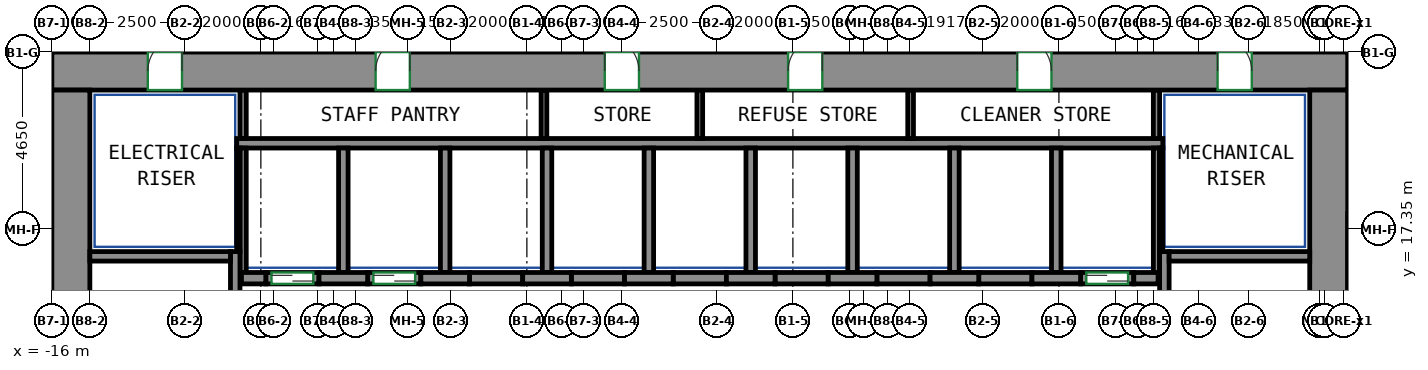
"""IFC4 building model, lengths in metres.
Left out: names, types, materials, properties, quantities, classifications, styles, units other than length and angle.
Written with IfcOpenShell. Run it as: python <this file> out.ifc"""

import sys

from ifc_helpers import new_model, si_unit, direction, frame, frame_2d, origin, place, context, subcontext, project, spatial, rectangle, extrude, source, transform, mapped, element, fill, save


model = new_model("IFC4")
c1 = context("Model", 3, precision=1e-05, world=origin(), true_north=direction((0.0, 1.0)))
c2 = subcontext(c1, "Body", "Model", "MODEL_VIEW")
j1 = project(units=[si_unit("LENGTHUNIT", "METRE"), si_unit("PLANEANGLEUNIT", "RADIAN")], contexts=[c1])
p1 = place(None, origin())
s1 = spatial("IfcSite", under=j1, at=p1, CompositionType="ELEMENT")
p2 = place(p1, origin())
s2 = spatial("IfcBuilding", under=s1, at=p2, CompositionType="ELEMENT")
p3 = place(p2, frame((0.0, 0.0, 55.0)))
s3 = spatial("IfcBuildingStorey", under=s2, at=p3, CompositionType="ELEMENT", Elevation=55.0)
m1 = source(origin(), c2, "Body", "SweptSolid", [
    extrude(rectangle(XDim=34.1, YDim=1.0, at=frame_2d((17.05, 0.0))), origin(), (0.0, 0.0, 1.0), 3.6),
])
p4 = place(p3, frame((-16.0, 21.5, 0.0), z_axis=(0.0, 0.0, 1.0), x_axis=(1.0, 0.0, 0.0)))
e1 = element("IfcWall", 1, at=p4, inside=s3, PredefinedType="SHEAR", context=c2, shape_type="MappedRepresentation", body=[
    mapped(m1, transform((0.0, 0.0, 0.0))),
])
p5 = place(p4, frame((8.52, 0.0, 0.0)))
e2 = element("IfcOpeningElement", 2, at=p5, cuts=e1, PredefinedType="OPENING", context=c2, shape_type="SweptSolid", body=[
    extrude(rectangle(XDim=0.9, YDim=2.1, at=frame_2d((0.45, 1.05))), frame((0.0, 0.51, 0.0), z_axis=(0.0, -1.0, 0.0), x_axis=(1.0, 0.0, 0.0)), (0.0, 0.0, 1.0), 1.02),
])
p6 = place(p4, frame((14.55, 0.0, 0.0)))
e3 = element("IfcOpeningElement", 3, at=p6, cuts=e1, PredefinedType="OPENING", context=c2, shape_type="SweptSolid", body=[
    extrude(rectangle(XDim=0.9, YDim=2.1, at=frame_2d((0.45, 1.05))), frame((0.0, 0.51, 0.0), z_axis=(0.0, -1.0, 0.0), x_axis=(1.0, 0.0, 0.0)), (0.0, 0.0, 1.0), 1.02),
])
p7 = place(p4, frame((19.374, 0.0, 0.0)))
e4 = element("IfcOpeningElement", 4, at=p7, cuts=e1, PredefinedType="OPENING", context=c2, shape_type="SweptSolid", body=[
    extrude(rectangle(XDim=0.9, YDim=2.1, at=frame_2d((0.45, 1.05))), frame((0.0, 0.51, 0.0), z_axis=(0.0, -1.0, 0.0), x_axis=(1.0, 0.0, 0.0)), (0.0, 0.0, 1.0), 1.02),
])
p8 = place(p4, frame((25.404, 0.0, 0.0)))
e5 = element("IfcOpeningElement", 5, at=p8, cuts=e1, PredefinedType="OPENING", context=c2, shape_type="SweptSolid", body=[
    extrude(rectangle(XDim=0.9, YDim=2.1, at=frame_2d((0.45, 1.05))), frame((0.0, 0.51, 0.0), z_axis=(0.0, -1.0, 0.0), x_axis=(1.0, 0.0, 0.0)), (0.0, 0.0, 1.0), 1.02),
])
p9 = place(p4, frame((2.525, 0.0, 0.0)))
e6 = element("IfcOpeningElement", 6, at=p9, cuts=e1, PredefinedType="OPENING", context=c2, shape_type="SweptSolid", body=[
    extrude(rectangle(XDim=0.9, YDim=2.1, at=frame_2d((0.45, 1.05))), frame((0.0, 0.51, 0.0), z_axis=(0.0, -1.0, 0.0), x_axis=(1.0, 0.0, 0.0)), (0.0, 0.0, 1.0), 1.02),
])
p10 = place(p4, frame((30.675, 0.0, 0.0)))
e7 = element("IfcOpeningElement", 7, at=p10, cuts=e1, PredefinedType="OPENING", context=c2, shape_type="SweptSolid", body=[
    extrude(rectangle(XDim=0.9, YDim=2.1, at=frame_2d((0.45, 1.05))), frame((0.0, 0.51, 0.0), z_axis=(0.0, -1.0, 0.0), x_axis=(1.0, 0.0, 0.0)), (0.0, 0.0, 1.0), 1.02),
])
m2 = source(origin(), c2, "Body", "SweptSolid", [
    extrude(rectangle(XDim=12.0, YDim=1.0, at=frame_2d((6.0, 0.0))), origin(), (0.0, 0.0, 1.0), 3.6),
])
for number, where, z_axis, x_axis in (
    (8, (-15.5, 9.0, 0.0), (0.0, 0.0, 1.0), (0.0, 1.0, 0.0)),
    (9, (17.6, 9.0, 0.0), (0.0, 0.0, 1.0), (0.0, 1.0, 0.0)),
):
    element("IfcWall", number, at=place(p3, frame(where, z_axis=z_axis, x_axis=x_axis)), inside=s3, PredefinedType="SHEAR", context=c2, shape_type="MappedRepresentation", body=[
        mapped(m2, transform((0.0, 0.0, 0.0))),
    ])
m3 = source(origin(), c2, "Body", "SweptSolid", [
    extrude(rectangle(XDim=7.75, YDim=0.25, at=frame_2d((3.875, 0.0))), origin(), (0.0, 0.0, 1.0), 3.6),
])
p11 = place(p3, frame((-11.175, 9.0, 0.0), z_axis=(0.0, 0.0, 1.0), x_axis=(0.0, 1.0, 0.0)))
e10 = element("IfcWall", 10, at=p11, inside=s3, PredefinedType="SHEAR", context=c2, shape_type="MappedRepresentation", body=[
    mapped(m3, transform((0.0, 0.0, 0.0))),
])
m4 = source(origin(), c2, "Body", "SweptSolid", [
    extrude(rectangle(XDim=3.7, YDim=0.25, at=frame_2d((1.85, 0.0))), origin(), (0.0, 0.0, 1.0), 3.6),
])
p12 = place(p3, frame((-15.0, 16.625, 0.0), z_axis=(0.0, 0.0, 1.0), x_axis=(1.0, 0.0, 0.0)))
e11 = element("IfcWall", 11, at=p12, inside=s3, PredefinedType="SHEAR", context=c2, shape_type="MappedRepresentation", body=[
    mapped(m4, transform((0.0, 0.0, 0.0))),
])
p13 = place(p3, frame((13.275, 9.0, 0.0), z_axis=(0.0, 0.0, 1.0), x_axis=(0.0, 1.0, 0.0)))
e12 = element("IfcWall", 12, at=p13, inside=s3, PredefinedType="SHEAR", context=c2, shape_type="MappedRepresentation", body=[
    mapped(m3, transform((0.0, 0.0, 0.0))),
])
m5 = source(origin(), c2, "Body", "SweptSolid", [
    extrude(rectangle(XDim=3.7, YDim=0.25, at=frame_2d((1.85, 0.0))), origin(), (0.0, 0.0, 1.0), 3.6),
])
p14 = place(p3, frame((13.4, 16.625, 0.0), z_axis=(0.0, 0.0, 1.0), x_axis=(1.0, 0.0, 0.0)))
e13 = element("IfcWall", 13, at=p14, inside=s3, PredefinedType="SHEAR", context=c2, shape_type="MappedRepresentation", body=[
    mapped(m5, transform((0.0, 0.0, 0.0))),
])
m6 = source(origin(), c2, "Body", "SweptSolid", [
    extrude(rectangle(XDim=0.64, YDim=0.3, at=frame_2d((0.32, 0.0))), origin(), (0.0, 0.0, 1.0), 3.6),
])
p15 = place(p3, frame((-11.01, 16.05, 0.0), z_axis=(0.0, 0.0, 1.0), x_axis=(1.0, 0.0, 0.0)))
e14 = element("IfcWall", 14, at=p15, inside=s3, PredefinedType="SHEAR", context=c2, shape_type="MappedRepresentation", body=[
    mapped(m6, transform((0.0, 0.0, 0.0))),
])
m7 = source(origin(), c2, "Body", "SweptSolid", [
    extrude(rectangle(XDim=1.28, YDim=0.3, at=frame_2d((0.64, 0.0))), origin(), (0.0, 0.0, 1.0), 3.6),
])
for number, where, z_axis, x_axis in (
    (15, (-8.97, 16.05, 0.0), (0.0, 0.0, 1.0), (1.0, 0.0, 0.0)),
    (16, (-6.29, 16.05, 0.0), (0.0, 0.0, 1.0), (1.0, 0.0, 0.0)),
    (17, (-3.61, 16.05, 0.0), (0.0, 0.0, 1.0), (1.0, 0.0, 0.0)),
    (18, (-0.93, 16.05, 0.0), (0.0, 0.0, 1.0), (1.0, 0.0, 0.0)),
    (19, (1.75, 16.05, 0.0), (0.0, 0.0, 1.0), (1.0, 0.0, 0.0)),
    (20, (4.43, 16.05, 0.0), (0.0, 0.0, 1.0), (1.0, 0.0, 0.0)),
):
    element("IfcWall", number, at=place(p3, frame(where, z_axis=z_axis, x_axis=x_axis)), inside=s3, PredefinedType="SHEAR", context=c2, shape_type="MappedRepresentation", body=[
        mapped(m7, transform((0.0, 0.0, 0.0))),
    ])
m8 = source(origin(), c2, "Body", "SweptSolid", [
    extrude(rectangle(XDim=1.28, YDim=0.3, at=frame_2d((0.64, 0.0))), origin(), (0.0, 0.0, 1.0), 3.6),
])
p16 = place(p3, frame((7.11, 16.05, 0.0), z_axis=(0.0, 0.0, 1.0), x_axis=(1.0, 0.0, 0.0)))
e21 = element("IfcWall", 21, at=p16, inside=s3, PredefinedType="SHEAR", context=c2, shape_type="MappedRepresentation", body=[
    mapped(m8, transform((0.0, 0.0, 0.0))),
])
p17 = place(p3, frame((9.79, 16.05, 0.0), z_axis=(0.0, 0.0, 1.0), x_axis=(1.0, 0.0, 0.0)))
e22 = element("IfcWall", 22, at=p17, inside=s3, PredefinedType="SHEAR", context=c2, shape_type="MappedRepresentation", body=[
    mapped(m7, transform((0.0, 0.0, 0.0))),
])
m9 = source(origin(), c2, "Body", "SweptSolid", [
    extrude(rectangle(XDim=0.64, YDim=0.3, at=frame_2d((0.32, 0.0))), origin(), (0.0, 0.0, 1.0), 3.6),
])
p18 = place(p3, frame((12.47, 16.05, 0.0), z_axis=(0.0, 0.0, 1.0), x_axis=(1.0, 0.0, 0.0)))
e23 = element("IfcWall", 23, at=p18, inside=s3, PredefinedType="SHEAR", context=c2, shape_type="MappedRepresentation", body=[
    mapped(m9, transform((0.0, 0.0, 0.0))),
])
m10 = source(origin(), c2, "Body", "SweptSolid", [
    extrude(rectangle(XDim=1.4, YDim=0.3, at=frame_2d((0.7, 0.0))), origin(), (0.0, 0.0, 1.0), 3.6),
])
p19 = place(p3, frame((11.07, 16.05, 0.0), z_axis=(0.0, 0.0, 1.0), x_axis=(1.0, 0.0, 0.0)))
e24 = element("IfcWall", 24, at=p19, inside=s3, PredefinedType="PARTITIONING", context=c2, shape_type="MappedRepresentation", body=[
    mapped(m10, transform((0.0, 0.0, 0.0))),
])
p20 = place(p19, frame((0.15, 0.0, 0.0)))
e25 = element("IfcOpeningElement", 25, at=p20, cuts=e24, PredefinedType="OPENING", context=c2, shape_type="SweptSolid", body=[
    extrude(rectangle(XDim=1.1, YDim=2.1, at=frame_2d((0.55, 1.05))), frame((0.0, 0.16, 0.0), z_axis=(0.0, -1.0, 0.0), x_axis=(1.0, 0.0, 0.0)), (0.0, 0.0, 1.0), 0.32),
])
m11 = source(origin(), c2, "Body", "SweptSolid", [
    extrude(rectangle(XDim=1.4, YDim=0.3, at=frame_2d((0.7, 0.0))), origin(), (0.0, 0.0, 1.0), 3.6),
])
p21 = place(p3, frame((-10.37, 16.05, 0.0), z_axis=(0.0, 0.0, 1.0), x_axis=(1.0, 0.0, 0.0)))
e26 = element("IfcWall", 26, at=p21, inside=s3, PredefinedType="PARTITIONING", context=c2, shape_type="MappedRepresentation", body=[
    mapped(m11, transform((0.0, 0.0, 0.0))),
])
p22 = place(p21, frame((0.15, 0.0, 0.0)))
e27 = element("IfcOpeningElement", 27, at=p22, cuts=e26, PredefinedType="OPENING", context=c2, shape_type="SweptSolid", body=[
    extrude(rectangle(XDim=1.1, YDim=2.1, at=frame_2d((0.55, 1.05))), frame((0.0, 0.16, 0.0), z_axis=(0.0, -1.0, 0.0), x_axis=(1.0, 0.0, 0.0)), (0.0, 0.0, 1.0), 0.32),
])
p23 = place(p3, frame((-7.69, 16.05, 0.0), z_axis=(0.0, 0.0, 1.0), x_axis=(1.0, 0.0, 0.0)))
e28 = element("IfcWall", 28, at=p23, inside=s3, PredefinedType="PARTITIONING", context=c2, shape_type="MappedRepresentation", body=[
    mapped(m10, transform((0.0, 0.0, 0.0))),
])
p24 = place(p23, frame((0.15, 0.0, 0.0)))
e29 = element("IfcOpeningElement", 29, at=p24, cuts=e28, PredefinedType="OPENING", context=c2, shape_type="SweptSolid", body=[
    extrude(rectangle(XDim=1.1, YDim=2.1, at=frame_2d((0.55, 1.05))), frame((0.0, 0.16, 0.0), z_axis=(0.0, -1.0, 0.0), x_axis=(1.0, 0.0, 0.0)), (0.0, 0.0, 1.0), 0.32),
])
p25 = place(p3, frame((-5.01, 16.05, 0.0), z_axis=(0.0, 0.0, 1.0), x_axis=(1.0, 0.0, 0.0)))
e30 = element("IfcWall", 30, at=p25, inside=s3, PredefinedType="PARTITIONING", context=c2, shape_type="MappedRepresentation", body=[
    mapped(m10, transform((0.0, 0.0, 0.0))),
])
p26 = place(p3, frame((-2.33, 16.05, 0.0), z_axis=(0.0, 0.0, 1.0), x_axis=(1.0, 0.0, 0.0)))
e31 = element("IfcWall", 31, at=p26, inside=s3, PredefinedType="PARTITIONING", context=c2, shape_type="MappedRepresentation", body=[
    mapped(m11, transform((0.0, 0.0, 0.0))),
])
for number, where, z_axis, x_axis in (
    (32, (0.35, 16.05, 0.0), (0.0, 0.0, 1.0), (1.0, 0.0, 0.0)),
    (33, (3.03, 16.05, 0.0), (0.0, 0.0, 1.0), (1.0, 0.0, 0.0)),
):
    element("IfcWall", number, at=place(p3, frame(where, z_axis=z_axis, x_axis=x_axis)), inside=s3, PredefinedType="PARTITIONING", context=c2, shape_type="MappedRepresentation", body=[
        mapped(m10, transform((0.0, 0.0, 0.0))),
    ])
for number, where, z_axis, x_axis in (
    (34, (5.71, 16.05, 0.0), (0.0, 0.0, 1.0), (1.0, 0.0, 0.0)),
    (35, (8.39, 16.05, 0.0), (0.0, 0.0, 1.0), (1.0, 0.0, 0.0)),
):
    element("IfcWall", number, at=place(p3, frame(where, z_axis=z_axis, x_axis=x_axis)), inside=s3, PredefinedType="PARTITIONING", context=c2, shape_type="MappedRepresentation", body=[
        mapped(m11, transform((0.0, 0.0, 0.0))),
    ])
m12 = source(origin(), c2, "Body", "SweptSolid", [
    extrude(rectangle(XDim=24.37, YDim=0.25, at=frame_2d((12.185, 0.0))), origin(), (0.0, 0.0, 1.0), 3.6),
])
p27 = place(p3, frame((-11.135, 19.6, 0.0), z_axis=(0.0, 0.0, 1.0), x_axis=(1.0, 0.0, 0.0)))
e36 = element("IfcWall", 36, at=p27, inside=s3, PredefinedType="PARTITIONING", context=c2, shape_type="MappedRepresentation", body=[
    mapped(m12, transform((0.0, 0.0, 0.0))),
])
m13 = source(origin(), c2, "Body", "SweptSolid", [
    extrude(rectangle(XDim=3.275, YDim=0.165, at=frame_2d((1.638, 0.0))), origin(), (0.0, 0.0, 1.0), 3.6),
])
p28 = place(p3, frame((13.067, 16.2, 0.0), z_axis=(0.0, 0.0, 1.0), x_axis=(0.0, 1.0, 0.0)))
e37 = element("IfcWall", 37, at=p28, inside=s3, PredefinedType="PARTITIONING", context=c2, shape_type="MappedRepresentation", body=[
    mapped(m13, transform((0.0, 0.0, 0.0))),
])
m14 = source(origin(), c2, "Body", "SweptSolid", [
    extrude(rectangle(XDim=1.275, YDim=0.165, at=frame_2d((0.637, 0.0))), origin(), (0.0, 0.0, 1.0), 3.6),
])
p29 = place(p3, frame((13.067, 19.725, 0.0), z_axis=(0.0, 0.0, 1.0), x_axis=(0.0, 1.0, 0.0)))
e38 = element("IfcWall", 38, at=p29, inside=s3, PredefinedType="PARTITIONING", context=c2, shape_type="MappedRepresentation", body=[
    mapped(m14, transform((0.0, 0.0, 0.0))),
])
p30 = place(p3, frame((-10.968, 16.2, 0.0), z_axis=(0.0, 0.0, 1.0), x_axis=(0.0, 1.0, 0.0)))
e39 = element("IfcWall", 39, at=p30, inside=s3, PredefinedType="PARTITIONING", context=c2, shape_type="MappedRepresentation", body=[
    mapped(m13, transform((0.0, 0.0, 0.0))),
])
p31 = place(p3, frame((-10.968, 19.725, 0.0), z_axis=(0.0, 0.0, 1.0), x_axis=(0.0, 1.0, 0.0)))
e40 = element("IfcWall", 40, at=p31, inside=s3, PredefinedType="PARTITIONING", context=c2, shape_type="MappedRepresentation", body=[
    mapped(m14, transform((0.0, 0.0, 0.0))),
])
m15 = source(origin(), c2, "Body", "SweptSolid", [
    extrude(rectangle(XDim=3.275, YDim=0.25, at=frame_2d((1.638, 0.0))), origin(), (0.0, 0.0, 1.0), 3.6),
])
p32 = place(p3, frame((10.43, 16.2, 0.0), z_axis=(0.0, 0.0, 1.0), x_axis=(0.0, 1.0, 0.0)))
e41 = element("IfcWall", 41, at=p32, inside=s3, PredefinedType="PARTITIONING", context=c2, shape_type="MappedRepresentation", body=[
    mapped(m15, transform((0.0, 0.0, 0.0))),
])
m16 = source(origin(), c2, "Body", "SweptSolid", [
    extrude(rectangle(XDim=2.725, YDim=0.085, at=frame_2d((1.363, 0.0))), origin(), (0.0, 0.0, 1.0), 3.6),
])
p33 = place(p3, frame((13.192, 16.75, 0.0), z_axis=(0.0, 0.0, 1.0), x_axis=(0.0, 1.0, 0.0)))
e42 = element("IfcWall", 42, at=p33, inside=s3, PredefinedType="PARTITIONING", context=c2, shape_type="MappedRepresentation", body=[
    mapped(m16, transform((0.0, 0.0, 0.0))),
])
for number, where, z_axis, x_axis in (
    (43, (2.39, 16.2, 0.0), (0.0, 0.0, 1.0), (0.0, 1.0, 0.0)),
    (44, (5.07, 16.2, 0.0), (0.0, 0.0, 1.0), (0.0, 1.0, 0.0)),
    (45, (7.75, 16.2, 0.0), (0.0, 0.0, 1.0), (0.0, 1.0, 0.0)),
    (46, (-0.29, 16.2, 0.0), (0.0, 0.0, 1.0), (0.0, 1.0, 0.0)),
):
    element("IfcWall", number, at=place(p3, frame(where, z_axis=z_axis, x_axis=x_axis)), inside=s3, PredefinedType="PARTITIONING", context=c2, shape_type="MappedRepresentation", body=[
        mapped(m15, transform((0.0, 0.0, 0.0))),
    ])
p34 = place(p3, frame((-11.093, 16.75, 0.0), z_axis=(0.0, 0.0, 1.0), x_axis=(0.0, 1.0, 0.0)))
e47 = element("IfcWall", 47, at=p34, inside=s3, PredefinedType="PARTITIONING", context=c2, shape_type="MappedRepresentation", body=[
    mapped(m16, transform((0.0, 0.0, 0.0))),
])
for number, where, z_axis, x_axis in (
    (48, (-2.97, 16.2, 0.0), (0.0, 0.0, 1.0), (0.0, 1.0, 0.0)),
    (49, (-5.65, 16.2, 0.0), (0.0, 0.0, 1.0), (0.0, 1.0, 0.0)),
    (50, (-8.33, 16.2, 0.0), (0.0, 0.0, 1.0), (0.0, 1.0, 0.0)),
):
    element("IfcWall", number, at=place(p3, frame(where, z_axis=z_axis, x_axis=x_axis)), inside=s3, PredefinedType="PARTITIONING", context=c2, shape_type="MappedRepresentation", body=[
        mapped(m15, transform((0.0, 0.0, 0.0))),
    ])
m17 = source(origin(), c2, "Body", "SweptSolid", [
    extrude(rectangle(XDim=1.275, YDim=0.15, at=frame_2d((0.637, 0.0))), origin(), (0.0, 0.0, 1.0), 3.6),
])
for number, where, z_axis, x_axis in (
    (51, (-3.05, 19.725, 0.0), (0.0, 0.0, 1.0), (0.0, 1.0, 0.0)),
    (52, (1.05, 19.725, 0.0), (0.0, 0.0, 1.0), (0.0, 1.0, 0.0)),
    (53, (6.598, 19.725, 0.0), (0.0, 0.0, 1.0), (0.0, 1.0, 0.0)),
):
    element("IfcWall", number, at=place(p3, frame(where, z_axis=z_axis, x_axis=x_axis)), inside=s3, PredefinedType="PARTITIONING", context=c2, shape_type="MappedRepresentation", body=[
        mapped(m17, transform((0.0, 0.0, 0.0))),
    ])
p35 = place(p20, origin())
e54 = element("IfcDoor", 54, at=p35, inside=s3, OperationType="DOUBLE_DOOR_SLIDING", PredefinedType="DOOR", context=c2, shape_type="SweptSolid", body=[
    extrude(rectangle(XDim=1.1, YDim=2.1, at=frame_2d((0.55, 1.05))), frame((0.0, 0.025, 0.0), z_axis=(0.0, -1.0, 0.0), x_axis=(1.0, 0.0, 0.0)), (0.0, 0.0, 1.0), 0.05),
])
fill(e25, e54)
p36 = place(p22, origin())
e55 = element("IfcDoor", 55, at=p36, inside=s3, OperationType="DOUBLE_DOOR_SLIDING", PredefinedType="DOOR", context=c2, shape_type="SweptSolid", body=[
    extrude(rectangle(XDim=1.1, YDim=2.1, at=frame_2d((0.55, 1.05))), frame((0.0, 0.025, 0.0), z_axis=(0.0, -1.0, 0.0), x_axis=(1.0, 0.0, 0.0)), (0.0, 0.0, 1.0), 0.05),
])
fill(e27, e55)
p37 = place(p24, origin())
e56 = element("IfcDoor", 56, at=p37, inside=s3, OperationType="DOUBLE_DOOR_SLIDING", PredefinedType="DOOR", context=c2, shape_type="SweptSolid", body=[
    extrude(rectangle(XDim=1.1, YDim=2.1, at=frame_2d((0.55, 1.05))), frame((0.0, 0.025, 0.0), z_axis=(0.0, -1.0, 0.0), x_axis=(1.0, 0.0, 0.0)), (0.0, 0.0, 1.0), 0.05),
])
fill(e29, e56)
p38 = place(p5, origin())
e57 = element("IfcDoor", 57, at=p38, inside=s3, OperationType="SINGLE_SWING_RIGHT", PredefinedType="DOOR", context=c2, shape_type="SweptSolid", body=[
    extrude(rectangle(XDim=0.9, YDim=2.1, at=frame_2d((0.45, 1.05))), frame((0.0, -0.355, 0.0), z_axis=(0.0, -1.0, 0.0), x_axis=(1.0, 0.0, 0.0)), (0.0, 0.0, 1.0), 0.05),
])
fill(e2, e57)
p39 = place(p6, origin())
e58 = element("IfcDoor", 58, at=p39, inside=s3, OperationType="SINGLE_SWING_LEFT", PredefinedType="DOOR", context=c2, shape_type="SweptSolid", body=[
    extrude(rectangle(XDim=0.9, YDim=2.1, at=frame_2d((0.45, 1.05))), frame((0.0, -0.355, 0.0), z_axis=(0.0, -1.0, 0.0), x_axis=(1.0, 0.0, 0.0)), (0.0, 0.0, 1.0), 0.05),
])
fill(e3, e58)
p40 = place(p7, origin())
e59 = element("IfcDoor", 59, at=p40, inside=s3, OperationType="SINGLE_SWING_RIGHT", PredefinedType="DOOR", context=c2, shape_type="SweptSolid", body=[
    extrude(rectangle(XDim=0.9, YDim=2.1, at=frame_2d((0.45, 1.05))), frame((0.0, -0.355, 0.0), z_axis=(0.0, -1.0, 0.0), x_axis=(1.0, 0.0, 0.0)), (0.0, 0.0, 1.0), 0.05),
])
fill(e4, e59)
p41 = place(p8, origin())
e60 = element("IfcDoor", 60, at=p41, inside=s3, OperationType="SINGLE_SWING_LEFT", PredefinedType="DOOR", context=c2, shape_type="SweptSolid", body=[
    extrude(rectangle(XDim=0.9, YDim=2.1, at=frame_2d((0.45, 1.05))), frame((0.0, -0.355, 0.0), z_axis=(0.0, -1.0, 0.0), x_axis=(1.0, 0.0, 0.0)), (0.0, 0.0, 1.0), 0.05),
])
fill(e5, e60)
p42 = place(p9, origin())
e61 = element("IfcDoor", 61, at=p42, inside=s3, OperationType="SINGLE_SWING_RIGHT", PredefinedType="DOOR", context=c2, shape_type="SweptSolid", body=[
    extrude(rectangle(XDim=0.9, YDim=2.1, at=frame_2d((0.45, 1.05))), frame((0.0, -0.355, 0.0), z_axis=(0.0, -1.0, 0.0), x_axis=(1.0, 0.0, 0.0)), (0.0, 0.0, 1.0), 0.05),
])
fill(e6, e61)
p43 = place(p10, origin())
e62 = element("IfcDoor", 62, at=p43, inside=s3, OperationType="SINGLE_SWING_LEFT", PredefinedType="DOOR", context=c2, shape_type="SweptSolid", body=[
    extrude(rectangle(XDim=0.9, YDim=2.1, at=frame_2d((0.45, 1.05))), frame((0.0, -0.355, 0.0), z_axis=(0.0, -1.0, 0.0), x_axis=(1.0, 0.0, 0.0)), (0.0, 0.0, 1.0), 0.05),
])
fill(e7, e62)
save(model, sys.argv[1])
